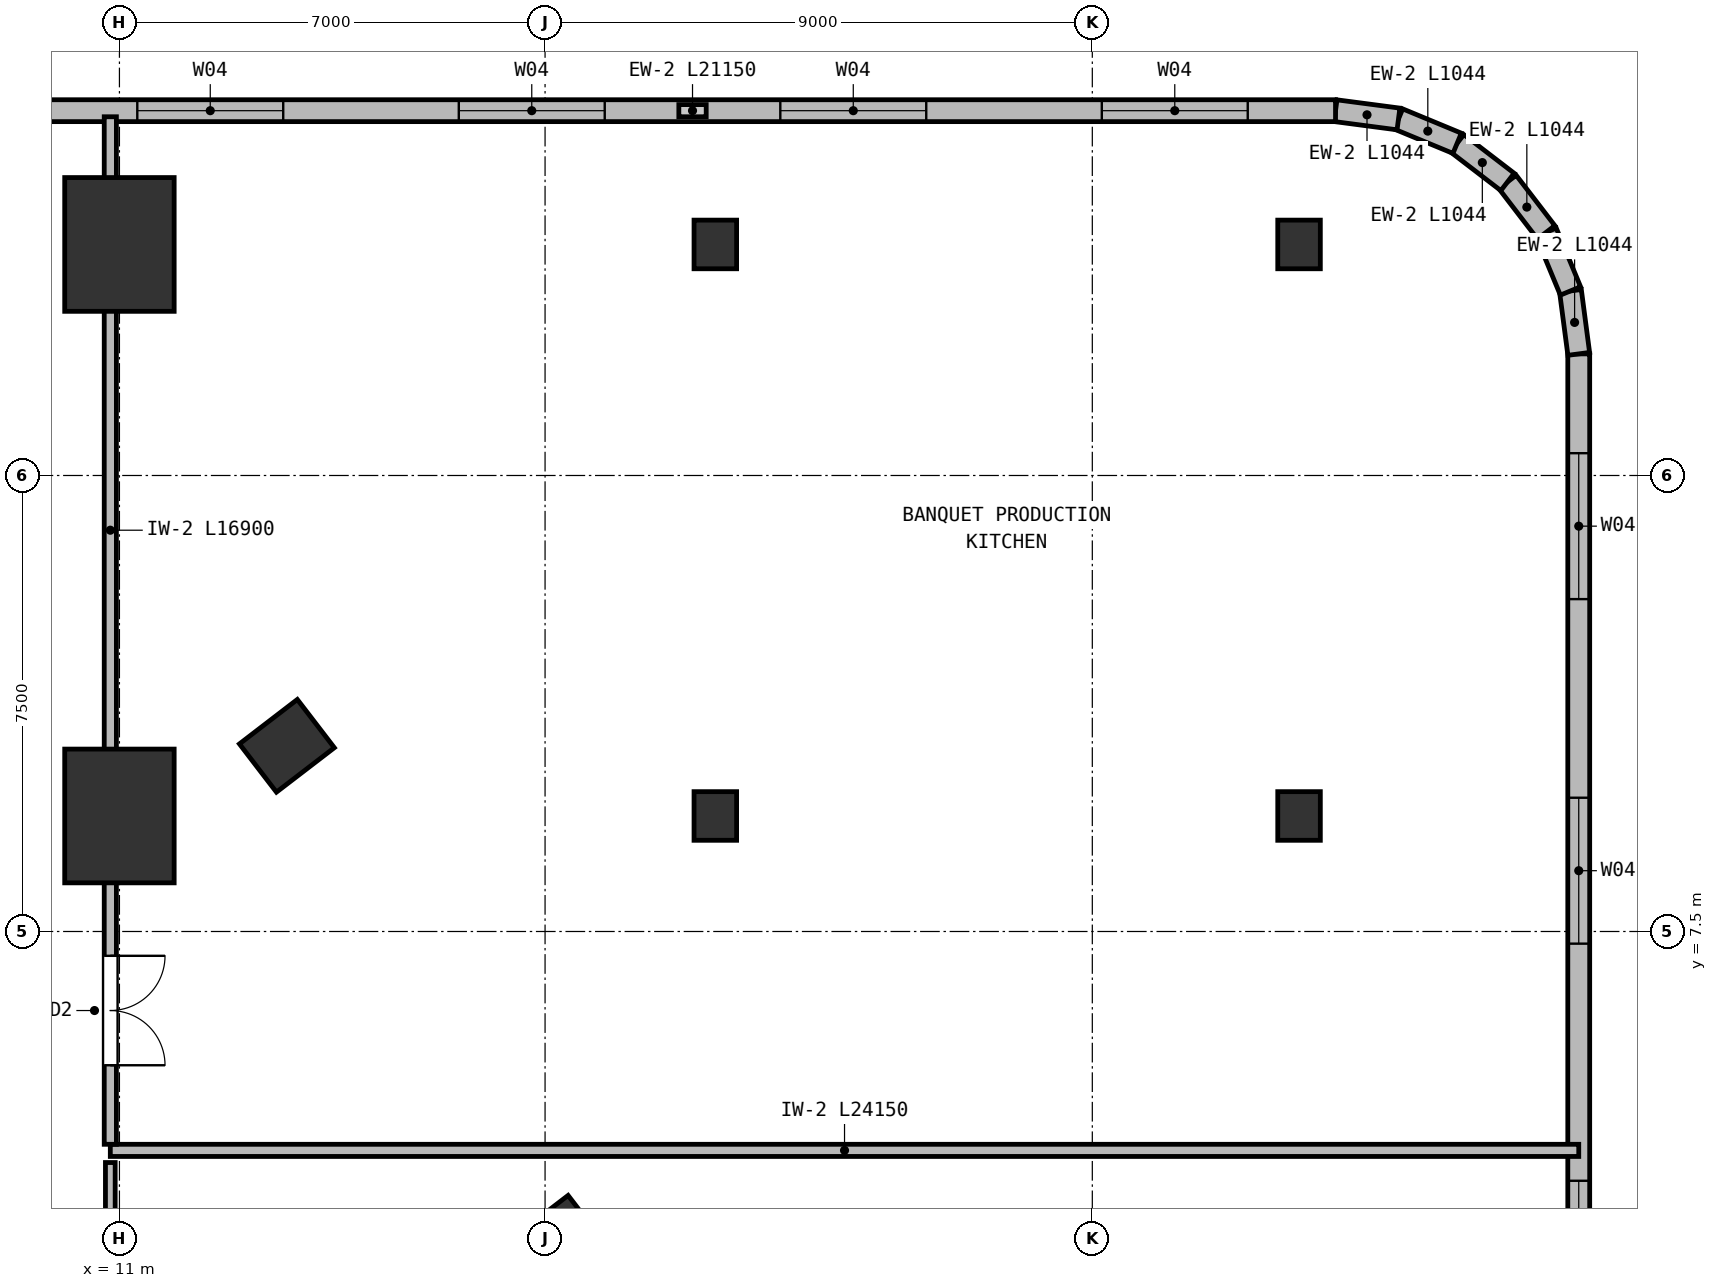
"""IFC4 building model, lengths in metres.
Left out: names, types, materials, properties, quantities, classifications, styles, units other than length and angle.
Written with IfcOpenShell. Run it as: python <this file> out.ifc"""

import sys

from ifc_helpers import new_model, si_unit, direction, frame, frame_2d, origin, origin_2d, place, context, subcontext, project, spatial, rectangle, extrude, element, fill, save


model = new_model("IFC4")
c1 = context("Model", 3, precision=1e-05, world=origin(), true_north=direction((0.0, 1.0)))
c2 = subcontext(c1, "Body", "Model", "MODEL_VIEW")
j1 = project(units=[si_unit("LENGTHUNIT", "METRE"), si_unit("PLANEANGLEUNIT", "RADIAN")], contexts=[c1])
p1 = place(None, origin())
s1 = spatial("IfcSite", under=j1, at=p1, CompositionType="ELEMENT")
p2 = place(p1, origin())
s2 = spatial("IfcBuilding", under=s1, at=p2, CompositionType="ELEMENT")
p3 = place(p2, frame((0.0, 0.0, 21.5)))
s3 = spatial("IfcBuildingStorey", under=s2, at=p3, CompositionType="ELEMENT", Elevation=21.5)
for number, where, z_axis, x_axis in (
    (1, (18.207, 2.397, 0.0), (0.0, 0.0, 1.0), (-0.609, 0.793, 0.0)),
    (2, (13.754, 10.554, 0.0), (0.0, 0.0, 1.0), (-0.609, 0.793, 0.0)),
):
    element("IfcColumn", number, at=place(p3, frame(where, z_axis=z_axis, x_axis=x_axis)), inside=s3, PredefinedType="COLUMN", context=c2, shape_type="SweptSolid", body=[
        extrude(rectangle(XDim=1.0, YDim=1.2, at=origin_2d()), origin(), (0.0, 0.0, 1.0), 4.5),
    ])
for number, where, z_axis, x_axis in (
    (3, (11.0, 9.4, 0.0), (0.0, 0.0, 1.0), (1.0, 0.0, 0.0)),
    (4, (11.0, 18.8, 0.0), (0.0, 0.0, 1.0), (1.0, 0.0, 0.0)),
):
    element("IfcColumn", number, at=place(p3, frame(where, z_axis=z_axis, x_axis=x_axis)), inside=s3, PredefinedType="COLUMN", context=c2, shape_type="SweptSolid", body=[
        extrude(rectangle(XDim=1.8, YDim=2.2, at=origin_2d()), origin(), (0.0, 0.0, 1.0), 4.5),
    ])
for number, where, z_axis, x_axis in (
    (5, (20.8, 9.4, 0.0), (0.0, 0.0, 1.0), (1.0, 0.0, 0.0)),
    (6, (20.8, 18.8, 0.0), (0.0, 0.0, 1.0), (1.0, 0.0, 0.0)),
    (7, (30.4, 9.4, 0.0), (0.0, 0.0, 1.0), (1.0, 0.0, 0.0)),
    (8, (30.4, 18.8, 0.0), (0.0, 0.0, 1.0), (1.0, 0.0, 0.0)),
):
    element("IfcColumn", number, at=place(p3, frame(where, z_axis=z_axis, x_axis=x_axis)), inside=s3, PredefinedType="COLUMN", context=c2, shape_type="SweptSolid", body=[
        extrude(rectangle(XDim=0.7, YDim=0.8, at=origin_2d()), origin(), (0.0, 0.0, 1.0), 4.5),
    ])
p4 = place(p3, frame((35.0, 17.0, 0.0), z_axis=(0.0, 0.0, 1.0), x_axis=(0.0, -1.0, 0.0)))
e9 = element("IfcWall", 9, at=p4, inside=s3, PredefinedType="SOLIDWALL", context=c2, shape_type="SweptSolid", body=[
    extrude(rectangle(XDim=34.0, YDim=0.36, at=frame_2d((17.0, 0.0))), origin(), (0.0, 0.0, 1.0), 4.22),
])
p5 = place(p4, frame((1.633, 0.0, 0.95)))
e10 = element("IfcOpeningElement", 10, at=p5, cuts=e9, PredefinedType="OPENING", context=c2, shape_type="SweptSolid", body=[
    extrude(rectangle(XDim=2.4, YDim=2.6, at=frame_2d((1.2, 1.3))), frame((0.0, 0.19, 0.0), z_axis=(0.0, -1.0, 0.0), x_axis=(1.0, 0.0, 0.0)), (0.0, 0.0, 1.0), 0.38),
])
p6 = place(p4, frame((7.3, 0.0, 0.95)))
e11 = element("IfcOpeningElement", 11, at=p6, cuts=e9, PredefinedType="OPENING", context=c2, shape_type="SweptSolid", body=[
    extrude(rectangle(XDim=2.4, YDim=2.6, at=frame_2d((1.2, 1.3))), frame((0.0, 0.19, 0.0), z_axis=(0.0, -1.0, 0.0), x_axis=(1.0, 0.0, 0.0)), (0.0, 0.0, 1.0), 0.38),
])
p7 = place(p4, frame((13.6, 0.0, 0.95)))
e12 = element("IfcOpeningElement", 12, at=p7, cuts=e9, PredefinedType="OPENING", context=c2, shape_type="SweptSolid", body=[
    extrude(rectangle(XDim=2.4, YDim=2.6, at=frame_2d((1.2, 1.3))), frame((0.0, 0.19, 0.0), z_axis=(0.0, -1.0, 0.0), x_axis=(1.0, 0.0, 0.0)), (0.0, 0.0, 1.0), 0.38),
])
p8 = place(p4, frame((18.633, 0.0, 0.95)))
e13 = element("IfcOpeningElement", 13, at=p8, cuts=e9, PredefinedType="OPENING", context=c2, shape_type="SweptSolid", body=[
    extrude(rectangle(XDim=2.4, YDim=2.6, at=frame_2d((1.2, 1.3))), frame((0.0, 0.19, 0.0), z_axis=(0.0, -1.0, 0.0), x_axis=(1.0, 0.0, 0.0)), (0.0, 0.0, 1.0), 0.38),
])
p9 = place(p4, frame((24.3, 0.0, 0.95)))
e14 = element("IfcOpeningElement", 14, at=p9, cuts=e9, PredefinedType="OPENING", context=c2, shape_type="SweptSolid", body=[
    extrude(rectangle(XDim=2.4, YDim=2.6, at=frame_2d((1.2, 1.3))), frame((0.0, 0.19, 0.0), z_axis=(0.0, -1.0, 0.0), x_axis=(1.0, 0.0, 0.0)), (0.0, 0.0, 1.0), 0.38),
])
p10 = place(p4, frame((29.967, 0.0, 0.95)))
e15 = element("IfcOpeningElement", 15, at=p10, cuts=e9, PredefinedType="OPENING", context=c2, shape_type="SweptSolid", body=[
    extrude(rectangle(XDim=2.4, YDim=2.6, at=frame_2d((1.2, 1.3))), frame((0.0, 0.19, 0.0), z_axis=(0.0, -1.0, 0.0), x_axis=(1.0, 0.0, 0.0)), (0.0, 0.0, 1.0), 0.38),
])
p11 = place(p3, frame((34.864, 18.035, 0.0), z_axis=(0.0, 0.0, 1.0), x_axis=(0.130448465198, -0.991455091231, 0.0)))
e16 = element("IfcWall", 16, at=p11, inside=s3, PredefinedType="SOLIDWALL", context=c2, shape_type="SweptSolid", body=[
    extrude(rectangle(XDim=1.044, YDim=0.36, at=frame_2d((0.522, 0.0))), origin(), (0.0, 0.0, 1.0), 4.22),
])
for number, where, z_axis, x_axis in (
    (17, (34.464, 19.0, 0.0), (0.0, 0.0, 1.0), (0.383, -0.924, 0.0)),
    (18, (33.828, 19.828, 0.0), (0.0, 0.0, 1.0), (0.609, -0.793, 0.0)),
    (19, (33.0, 20.464, 0.0), (0.0, 0.0, 1.0), (0.793, -0.609, 0.0)),
    (20, (32.035, 20.864, 0.0), (0.0, 0.0, 1.0), (0.924, -0.383, 0.0)),
):
    element("IfcWall", number, at=place(p3, frame(where, z_axis=z_axis, x_axis=x_axis)), inside=s3, PredefinedType="SOLIDWALL", context=c2, shape_type="SweptSolid", body=[
        extrude(rectangle(XDim=1.044, YDim=0.36, at=frame_2d((0.522, 0.0))), origin(), (0.0, 0.0, 1.0), 4.22),
    ])
p12 = place(p3, frame((31.0, 21.0, 0.0), z_axis=(0.0, 0.0, 1.0), x_axis=(0.991455091231, -0.130448465198, 0.0)))
e21 = element("IfcWall", 21, at=p12, inside=s3, PredefinedType="SOLIDWALL", context=c2, shape_type="SweptSolid", body=[
    extrude(rectangle(XDim=1.044, YDim=0.36, at=frame_2d((0.522, 0.0))), origin(), (0.0, 0.0, 1.0), 4.22),
])
p13 = place(p3, frame((9.85, 21.0, 0.0), z_axis=(0.0, 0.0, 1.0), x_axis=(1.0, 0.0, 0.0)))
e22 = element("IfcWall", 22, at=p13, inside=s3, PredefinedType="SOLIDWALL", context=c2, shape_type="SweptSolid", body=[
    extrude(rectangle(XDim=21.15, YDim=0.36, at=frame_2d((10.575, 0.0))), origin(), (0.0, 0.0, 1.0), 4.22),
])
p14 = place(p13, frame((1.444, 0.0, 0.95)))
e23 = element("IfcOpeningElement", 23, at=p14, cuts=e22, PredefinedType="OPENING", context=c2, shape_type="SweptSolid", body=[
    extrude(rectangle(XDim=2.4, YDim=2.6, at=frame_2d((1.2, 1.3))), frame((0.0, 0.19, 0.0), z_axis=(0.0, -1.0, 0.0), x_axis=(1.0, 0.0, 0.0)), (0.0, 0.0, 1.0), 0.38),
])
p15 = place(p13, frame((6.731, 0.0, 0.95)))
e24 = element("IfcOpeningElement", 24, at=p15, cuts=e22, PredefinedType="OPENING", context=c2, shape_type="SweptSolid", body=[
    extrude(rectangle(XDim=2.4, YDim=2.6, at=frame_2d((1.2, 1.3))), frame((0.0, 0.19, 0.0), z_axis=(0.0, -1.0, 0.0), x_axis=(1.0, 0.0, 0.0)), (0.0, 0.0, 1.0), 0.38),
])
p16 = place(p13, frame((12.019, 0.0, 0.95)))
e25 = element("IfcOpeningElement", 25, at=p16, cuts=e22, PredefinedType="OPENING", context=c2, shape_type="SweptSolid", body=[
    extrude(rectangle(XDim=2.4, YDim=2.6, at=frame_2d((1.2, 1.3))), frame((0.0, 0.19, 0.0), z_axis=(0.0, -1.0, 0.0), x_axis=(1.0, 0.0, 0.0)), (0.0, 0.0, 1.0), 0.38),
])
p17 = place(p13, frame((17.306, 0.0, 0.95)))
e26 = element("IfcOpeningElement", 26, at=p17, cuts=e22, PredefinedType="OPENING", context=c2, shape_type="SweptSolid", body=[
    extrude(rectangle(XDim=2.4, YDim=2.6, at=frame_2d((1.2, 1.3))), frame((0.0, 0.19, 0.0), z_axis=(0.0, -1.0, 0.0), x_axis=(1.0, 0.0, 0.0)), (0.0, 0.0, 1.0), 0.38),
])
p18 = place(p3, frame((10.85, 3.9, 0.0), z_axis=(0.0, 0.0, 1.0), x_axis=(1.0, 0.0, 0.0)))
e27 = element("IfcWall", 27, at=p18, inside=s3, PredefinedType="PARTITIONING", context=c2, shape_type="SweptSolid", body=[
    extrude(rectangle(XDim=24.15, YDim=0.2, at=frame_2d((12.075, 0.0))), origin(), (0.0, 0.0, 1.0), 4.22),
])
p19 = place(p3, frame((10.85, 20.9, 0.0), z_axis=(0.0, 0.0, 1.0), x_axis=(0.0, -1.0, 0.0)))
e28 = element("IfcWall", 28, at=p19, inside=s3, PredefinedType="PARTITIONING", context=c2, shape_type="SweptSolid", body=[
    extrude(rectangle(XDim=16.9, YDim=0.2, at=frame_2d((8.45, 0.0))), origin(), (0.0, 0.0, 1.0), 3.6),
])
p20 = place(p19, frame((13.8, 0.0, 0.0)))
e29 = element("IfcOpeningElement", 29, at=p20, cuts=e28, PredefinedType="OPENING", context=c2, shape_type="SweptSolid", body=[
    extrude(rectangle(XDim=1.8, YDim=2.2, at=frame_2d((0.9, 1.1))), frame((0.0, 0.11, 0.0), z_axis=(0.0, -1.0, 0.0), x_axis=(1.0, 0.0, 0.0)), (0.0, 0.0, 1.0), 0.22),
])
p21 = place(p3, frame((10.85, 3.7, 0.0), z_axis=(0.0, 0.0, 1.0), x_axis=(0.0, -1.0, 0.0)))
e30 = element("IfcWall", 30, at=p21, inside=s3, PredefinedType="PARTITIONING", context=c2, shape_type="SweptSolid", body=[
    extrude(rectangle(XDim=9.48, YDim=0.16, at=frame_2d((4.74, 0.0))), origin(), (0.0, 0.0, 1.0), 3.6),
])
p22 = place(p21, frame((5.46, 0.0, 0.0)))
e31 = element("IfcOpeningElement", 31, at=p22, cuts=e30, PredefinedType="OPENING", context=c2, shape_type="SweptSolid", body=[
    extrude(rectangle(XDim=1.5, YDim=2.2, at=frame_2d((0.75, 1.1))), frame((0.0, 0.09, 0.0), z_axis=(0.0, -1.0, 0.0), x_axis=(1.0, 0.0, 0.0)), (0.0, 0.0, 1.0), 0.18),
])
p23 = place(p5, origin())
e32 = element("IfcWindow", 32, at=p23, inside=s3, PartitioningType="SINGLE_PANEL", PredefinedType="WINDOW", context=c2, shape_type="SweptSolid", body=[
    extrude(rectangle(XDim=2.4, YDim=2.6, at=frame_2d((1.2, 1.3))), frame((0.0, 0.03, 0.0), z_axis=(0.0, -1.0, 0.0), x_axis=(1.0, 0.0, 0.0)), (0.0, 0.0, 1.0), 0.06),
])
fill(e10, e32)
p24 = place(p6, origin())
e33 = element("IfcWindow", 33, at=p24, inside=s3, PartitioningType="SINGLE_PANEL", PredefinedType="WINDOW", context=c2, shape_type="SweptSolid", body=[
    extrude(rectangle(XDim=2.4, YDim=2.6, at=frame_2d((1.2, 1.3))), frame((0.0, 0.03, 0.0), z_axis=(0.0, -1.0, 0.0), x_axis=(1.0, 0.0, 0.0)), (0.0, 0.0, 1.0), 0.06),
])
fill(e11, e33)
p25 = place(p7, origin())
e34 = element("IfcWindow", 34, at=p25, inside=s3, PartitioningType="SINGLE_PANEL", PredefinedType="WINDOW", context=c2, shape_type="SweptSolid", body=[
    extrude(rectangle(XDim=2.4, YDim=2.6, at=frame_2d((1.2, 1.3))), frame((0.0, 0.03, 0.0), z_axis=(0.0, -1.0, 0.0), x_axis=(1.0, 0.0, 0.0)), (0.0, 0.0, 1.0), 0.06),
])
fill(e12, e34)
p26 = place(p14, origin())
e35 = element("IfcWindow", 35, at=p26, inside=s3, PartitioningType="SINGLE_PANEL", PredefinedType="WINDOW", context=c2, shape_type="SweptSolid", body=[
    extrude(rectangle(XDim=2.4, YDim=2.6, at=frame_2d((1.2, 1.3))), frame((0.0, 0.03, 0.0), z_axis=(0.0, -1.0, 0.0), x_axis=(1.0, 0.0, 0.0)), (0.0, 0.0, 1.0), 0.06),
])
fill(e23, e35)
p27 = place(p15, origin())
e36 = element("IfcWindow", 36, at=p27, inside=s3, PartitioningType="SINGLE_PANEL", PredefinedType="WINDOW", context=c2, shape_type="SweptSolid", body=[
    extrude(rectangle(XDim=2.4, YDim=2.6, at=frame_2d((1.2, 1.3))), frame((0.0, 0.03, 0.0), z_axis=(0.0, -1.0, 0.0), x_axis=(1.0, 0.0, 0.0)), (0.0, 0.0, 1.0), 0.06),
])
fill(e24, e36)
p28 = place(p16, origin())
e37 = element("IfcWindow", 37, at=p28, inside=s3, PartitioningType="SINGLE_PANEL", PredefinedType="WINDOW", context=c2, shape_type="SweptSolid", body=[
    extrude(rectangle(XDim=2.4, YDim=2.6, at=frame_2d((1.2, 1.3))), frame((0.0, 0.03, 0.0), z_axis=(0.0, -1.0, 0.0), x_axis=(1.0, 0.0, 0.0)), (0.0, 0.0, 1.0), 0.06),
])
fill(e25, e37)
p29 = place(p17, origin())
e38 = element("IfcWindow", 38, at=p29, inside=s3, PartitioningType="SINGLE_PANEL", PredefinedType="WINDOW", context=c2, shape_type="SweptSolid", body=[
    extrude(rectangle(XDim=2.4, YDim=2.6, at=frame_2d((1.2, 1.3))), frame((0.0, 0.03, 0.0), z_axis=(0.0, -1.0, 0.0), x_axis=(1.0, 0.0, 0.0)), (0.0, 0.0, 1.0), 0.06),
])
fill(e26, e38)
p30 = place(p20, origin())
e39 = element("IfcDoor", 39, at=p30, inside=s3, OperationType="DOUBLE_DOOR_SINGLE_SWING", PredefinedType="DOOR", context=c2, shape_type="SweptSolid", body=[
    extrude(rectangle(XDim=1.8, YDim=2.2, at=frame_2d((0.9, 1.1))), frame((0.0, 0.025, 0.0), z_axis=(0.0, -1.0, 0.0), x_axis=(1.0, 0.0, 0.0)), (0.0, 0.0, 1.0), 0.05),
])
fill(e29, e39)
save(model, sys.argv[1])
